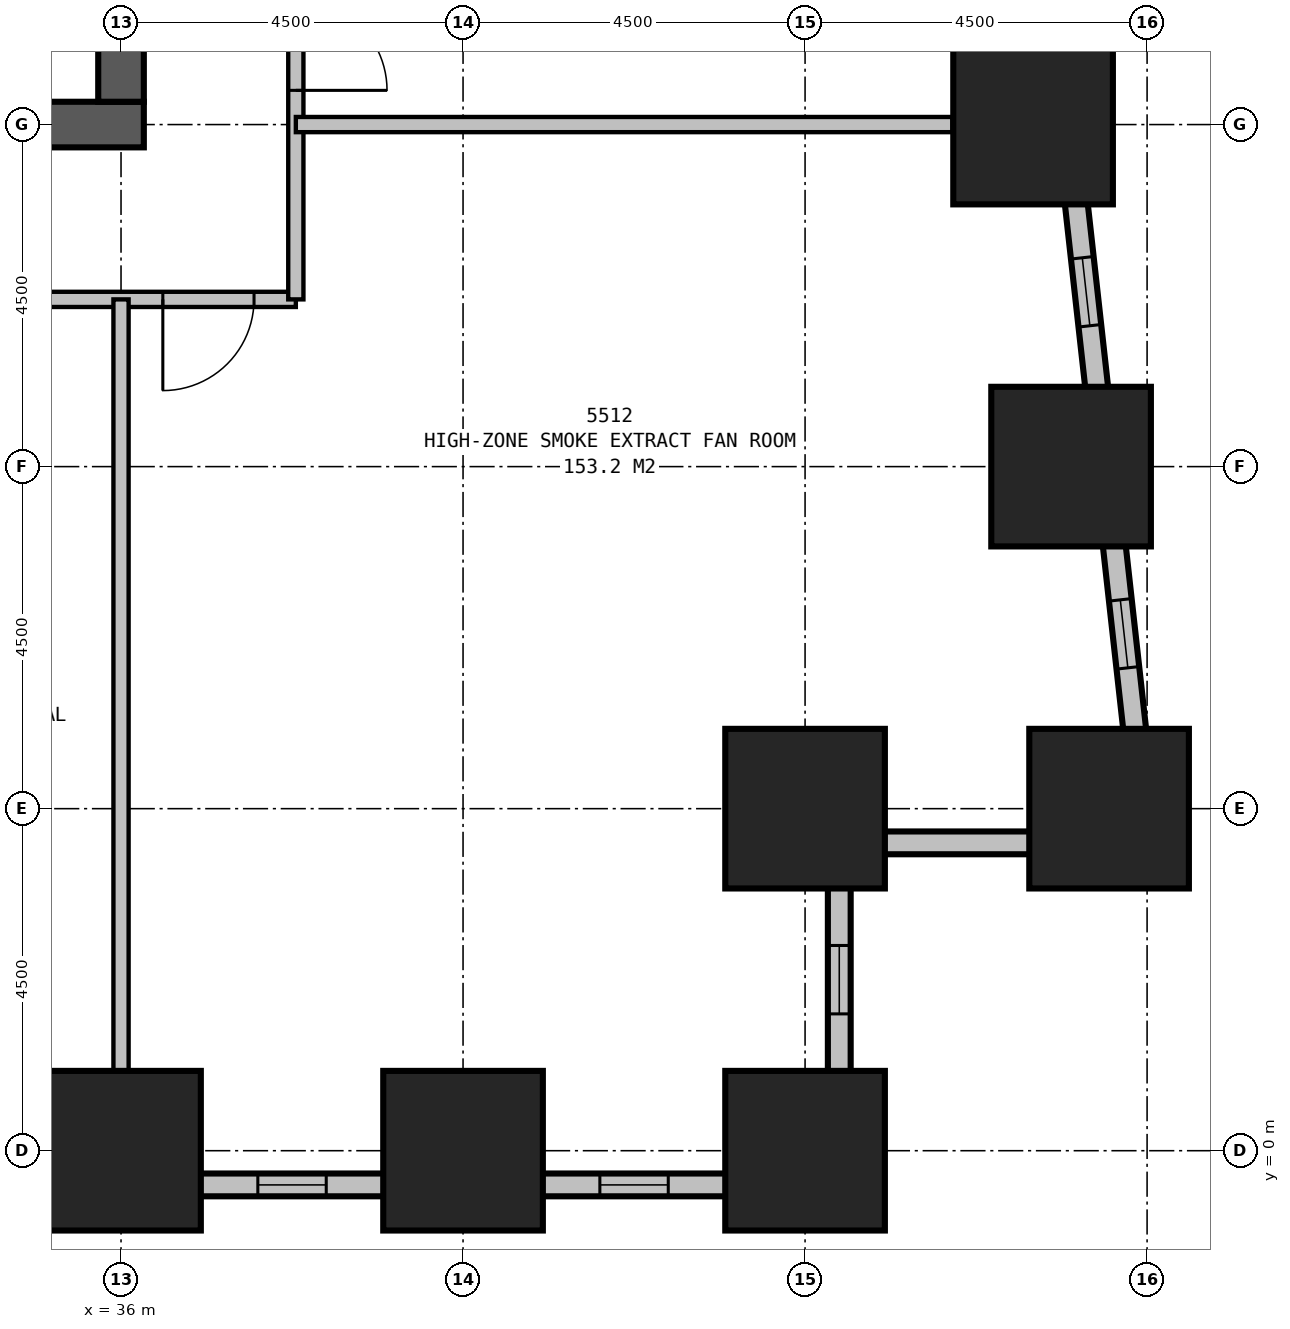
"""IFC4 building model, lengths in metres.
Left out: names, types, materials, properties, quantities, classifications, styles, units other than length and angle.
Written with IfcOpenShell. Run it as: python <this file> out.ifc"""

import sys

from ifc_helpers import new_model, si_unit, direction, frame, frame_2d, origin, origin_2d, place, context, subcontext, project, spatial, rectangle, extrude, element, fill, save


model = new_model("IFC4")
c1 = context("Model", 3, precision=1e-05, world=origin(), true_north=direction((0.0, 1.0)))
c2 = subcontext(c1, "Body", "Model", "MODEL_VIEW")
j1 = project(units=[si_unit("LENGTHUNIT", "METRE"), si_unit("PLANEANGLEUNIT", "RADIAN")], contexts=[c1])
p1 = place(None, origin())
s1 = spatial("IfcSite", under=j1, at=p1, CompositionType="ELEMENT")
p2 = place(p1, origin())
s2 = spatial("IfcBuilding", under=s1, at=p2, CompositionType="ELEMENT")
p3 = place(p2, frame((0.0, 0.0, 211.4)))
s3 = spatial("IfcBuildingStorey", under=s2, at=p3, CompositionType="ELEMENT", Elevation=211.4)
for number, where, z_axis, x_axis in (
    (1, (36.0, 0.0, 0.0), (0.0, 0.0, 1.0), (1.0, 0.0, 0.0)),
    (2, (40.5, 0.0, 0.0), (0.0, 0.0, 1.0), (1.0, 0.0, 0.0)),
    (3, (45.0, 0.0, 0.0), (0.0, 0.0, 1.0), (1.0, 0.0, 0.0)),
    (4, (45.0, 4.5, 0.0), (0.0, 0.0, 1.0), (1.0, 0.0, 0.0)),
    (5, (49.0, 4.5, 0.0), (0.0, 0.0, 1.0), (1.0, 0.0, 0.0)),
    (6, (48.5, 9.0, 0.0), (0.0, 0.0, 1.0), (1.0, 0.0, 0.0)),
    (7, (48.0, 13.5, 0.0), (0.0, 0.0, 1.0), (1.0, 0.0, 0.0)),
):
    element("IfcColumn", number, at=place(p3, frame(where, z_axis=z_axis, x_axis=x_axis)), inside=s3, PredefinedType="COLUMN", context=c2, shape_type="SweptSolid", body=[
        extrude(rectangle(XDim=2.1, YDim=2.1, at=origin_2d()), origin(), (0.0, 0.0, 1.0), 6.0),
    ])
p4 = place(p3, frame((13.2, 13.5, 0.0), z_axis=(0.0, 0.0, 1.0), x_axis=(1.0, 0.0, 0.0)))
e8 = element("IfcWall", 8, at=p4, inside=s3, PredefinedType="SHEAR", context=c2, shape_type="SweptSolid", body=[
    extrude(rectangle(XDim=23.1, YDim=0.6, at=frame_2d((11.55, 0.0))), origin(), (0.0, 0.0, 1.0), 6.0),
])
p5 = place(p3, frame((36.0, 13.8, 0.0), z_axis=(0.0, 0.0, 1.0), x_axis=(0.0, 1.0, 0.0)))
e9 = element("IfcWall", 9, at=p5, inside=s3, PredefinedType="SHEAR", context=c2, shape_type="SweptSolid", body=[
    extrude(rectangle(XDim=2.7, YDim=0.6, at=frame_2d((1.35, 0.0))), origin(), (0.0, 0.0, 1.0), 6.0),
])
p6 = place(p3, frame((8.4, -0.45, 0.0), z_axis=(0.0, 0.0, 1.0), x_axis=(1.0, 0.0, 0.0)))
e10 = element("IfcWall", 10, at=p6, inside=s3, PredefinedType="STANDARD", context=c2, shape_type="SweptSolid", body=[
    extrude(rectangle(XDim=37.2, YDim=0.3, at=frame_2d((18.6, 0.0))), origin(), (0.0, 0.0, 1.0), 4.6),
])
p7 = place(p6, frame((2.4, 0.0, 0.5)))
e11 = element("IfcOpeningElement", 11, at=p7, cuts=e10, PredefinedType="OPENING", context=c2, shape_type="SweptSolid", body=[
    extrude(rectangle(XDim=0.9, YDim=1.2, at=frame_2d((0.45, 0.6))), frame((0.0, 0.16, 0.0), z_axis=(0.0, -1.0, 0.0), x_axis=(1.0, 0.0, 0.0)), (0.0, 0.0, 1.0), 0.32),
])
p8 = place(p6, frame((6.9, 0.0, 0.5)))
e12 = element("IfcOpeningElement", 12, at=p8, cuts=e10, PredefinedType="OPENING", context=c2, shape_type="SweptSolid", body=[
    extrude(rectangle(XDim=0.9, YDim=1.2, at=frame_2d((0.45, 0.6))), frame((0.0, 0.16, 0.0), z_axis=(0.0, -1.0, 0.0), x_axis=(1.0, 0.0, 0.0)), (0.0, 0.0, 1.0), 0.32),
])
p9 = place(p6, frame((11.4, 0.0, 0.5)))
e13 = element("IfcOpeningElement", 13, at=p9, cuts=e10, PredefinedType="OPENING", context=c2, shape_type="SweptSolid", body=[
    extrude(rectangle(XDim=0.9, YDim=1.2, at=frame_2d((0.45, 0.6))), frame((0.0, 0.16, 0.0), z_axis=(0.0, -1.0, 0.0), x_axis=(1.0, 0.0, 0.0)), (0.0, 0.0, 1.0), 0.32),
])
p10 = place(p6, frame((15.9, 0.0, 0.5)))
e14 = element("IfcOpeningElement", 14, at=p10, cuts=e10, PredefinedType="OPENING", context=c2, shape_type="SweptSolid", body=[
    extrude(rectangle(XDim=0.9, YDim=1.2, at=frame_2d((0.45, 0.6))), frame((0.0, 0.16, 0.0), z_axis=(0.0, -1.0, 0.0), x_axis=(1.0, 0.0, 0.0)), (0.0, 0.0, 1.0), 0.32),
])
p11 = place(p6, frame((20.4, 0.0, 0.5)))
e15 = element("IfcOpeningElement", 15, at=p11, cuts=e10, PredefinedType="OPENING", context=c2, shape_type="SweptSolid", body=[
    extrude(rectangle(XDim=0.9, YDim=1.2, at=frame_2d((0.45, 0.6))), frame((0.0, 0.16, 0.0), z_axis=(0.0, -1.0, 0.0), x_axis=(1.0, 0.0, 0.0)), (0.0, 0.0, 1.0), 0.32),
])
p12 = place(p6, frame((24.9, 0.0, 0.5)))
e16 = element("IfcOpeningElement", 16, at=p12, cuts=e10, PredefinedType="OPENING", context=c2, shape_type="SweptSolid", body=[
    extrude(rectangle(XDim=0.9, YDim=1.2, at=frame_2d((0.45, 0.6))), frame((0.0, 0.16, 0.0), z_axis=(0.0, -1.0, 0.0), x_axis=(1.0, 0.0, 0.0)), (0.0, 0.0, 1.0), 0.32),
])
p13 = place(p6, frame((29.4, 0.0, 0.5)))
e17 = element("IfcOpeningElement", 17, at=p13, cuts=e10, PredefinedType="OPENING", context=c2, shape_type="SweptSolid", body=[
    extrude(rectangle(XDim=0.9, YDim=1.2, at=frame_2d((0.45, 0.6))), frame((0.0, 0.16, 0.0), z_axis=(0.0, -1.0, 0.0), x_axis=(1.0, 0.0, 0.0)), (0.0, 0.0, 1.0), 0.32),
])
p14 = place(p6, frame((33.9, 0.0, 0.5)))
e18 = element("IfcOpeningElement", 18, at=p14, cuts=e10, PredefinedType="OPENING", context=c2, shape_type="SweptSolid", body=[
    extrude(rectangle(XDim=0.9, YDim=1.2, at=frame_2d((0.45, 0.6))), frame((0.0, 0.16, 0.0), z_axis=(0.0, -1.0, 0.0), x_axis=(1.0, 0.0, 0.0)), (0.0, 0.0, 1.0), 0.32),
])
p15 = place(p3, frame((45.45, -0.6, 0.0), z_axis=(0.0, 0.0, 1.0), x_axis=(0.0, 1.0, 0.0)))
e19 = element("IfcWall", 19, at=p15, inside=s3, PredefinedType="STANDARD", context=c2, shape_type="SweptSolid", body=[
    extrude(rectangle(XDim=4.8, YDim=0.3, at=frame_2d((2.4, 0.0))), origin(), (0.0, 0.0, 1.0), 4.6),
])
p16 = place(p15, frame((2.4, 0.0, 0.5)))
e20 = element("IfcOpeningElement", 20, at=p16, cuts=e19, PredefinedType="OPENING", context=c2, shape_type="SweptSolid", body=[
    extrude(rectangle(XDim=0.9, YDim=1.2, at=frame_2d((0.45, 0.6))), frame((0.0, 0.16, 0.0), z_axis=(0.0, -1.0, 0.0), x_axis=(1.0, 0.0, 0.0)), (0.0, 0.0, 1.0), 0.32),
])
p17 = place(p3, frame((45.3, 4.05, 0.0), z_axis=(0.0, 0.0, 1.0), x_axis=(1.0, 0.0, 0.0)))
e21 = element("IfcWall", 21, at=p17, inside=s3, PredefinedType="STANDARD", context=c2, shape_type="SweptSolid", body=[
    extrude(rectangle(XDim=4.353, YDim=0.3, at=frame_2d((2.176, 0.0))), origin(), (0.0, 0.0, 1.0), 4.6),
])
p18 = place(p3, frame((49.519, 3.901, 0.0), z_axis=(0.0, 0.0, 1.0), x_axis=(-0.110429082637, 0.993884006164, 0.0)))
e22 = element("IfcWall", 22, at=p18, inside=s3, PredefinedType="STANDARD", context=c2, shape_type="SweptSolid", body=[
    extrude(rectangle(XDim=32.899, YDim=0.3, at=frame_2d((16.45, 0.0))), origin(), (0.0, 0.0, 1.0), 4.6),
])
p19 = place(p18, frame((2.467, 0.0, 0.5)))
e23 = element("IfcOpeningElement", 23, at=p19, cuts=e22, PredefinedType="OPENING", context=c2, shape_type="SweptSolid", body=[
    extrude(rectangle(XDim=0.9, YDim=1.2, at=frame_2d((0.45, 0.6))), frame((0.0, 0.16, 0.0), z_axis=(0.0, -1.0, 0.0), x_axis=(1.0, 0.0, 0.0)), (0.0, 0.0, 1.0), 0.32),
])
p20 = place(p18, frame((6.995, 0.0, 0.5)))
e24 = element("IfcOpeningElement", 24, at=p20, cuts=e22, PredefinedType="OPENING", context=c2, shape_type="SweptSolid", body=[
    extrude(rectangle(XDim=0.9, YDim=1.2, at=frame_2d((0.45, 0.6))), frame((0.0, 0.16, 0.0), z_axis=(0.0, -1.0, 0.0), x_axis=(1.0, 0.0, 0.0)), (0.0, 0.0, 1.0), 0.32),
])
p21 = place(p18, frame((11.522, 0.0, 0.5)))
e25 = element("IfcOpeningElement", 25, at=p21, cuts=e22, PredefinedType="OPENING", context=c2, shape_type="SweptSolid", body=[
    extrude(rectangle(XDim=0.9, YDim=1.2, at=frame_2d((0.45, 0.6))), frame((0.0, 0.16, 0.0), z_axis=(0.0, -1.0, 0.0), x_axis=(1.0, 0.0, 0.0)), (0.0, 0.0, 1.0), 0.32),
])
p22 = place(p18, frame((16.05, 0.0, 0.5)))
e26 = element("IfcOpeningElement", 26, at=p22, cuts=e22, PredefinedType="OPENING", context=c2, shape_type="SweptSolid", body=[
    extrude(rectangle(XDim=0.9, YDim=1.2, at=frame_2d((0.45, 0.6))), frame((0.0, 0.16, 0.0), z_axis=(0.0, -1.0, 0.0), x_axis=(1.0, 0.0, 0.0)), (0.0, 0.0, 1.0), 0.32),
])
p23 = place(p18, frame((20.578, 0.0, 0.5)))
e27 = element("IfcOpeningElement", 27, at=p23, cuts=e22, PredefinedType="OPENING", context=c2, shape_type="SweptSolid", body=[
    extrude(rectangle(XDim=0.9, YDim=1.2, at=frame_2d((0.45, 0.6))), frame((0.0, 0.16, 0.0), z_axis=(0.0, -1.0, 0.0), x_axis=(1.0, 0.0, 0.0)), (0.0, 0.0, 1.0), 0.32),
])
p24 = place(p18, frame((25.105, 0.0, 0.5)))
e28 = element("IfcOpeningElement", 28, at=p24, cuts=e22, PredefinedType="OPENING", context=c2, shape_type="SweptSolid", body=[
    extrude(rectangle(XDim=0.9, YDim=1.2, at=frame_2d((0.45, 0.6))), frame((0.0, 0.16, 0.0), z_axis=(0.0, -1.0, 0.0), x_axis=(1.0, 0.0, 0.0)), (0.0, 0.0, 1.0), 0.32),
])
p25 = place(p18, frame((29.633, 0.0, 0.5)))
e29 = element("IfcOpeningElement", 29, at=p25, cuts=e22, PredefinedType="OPENING", context=c2, shape_type="SweptSolid", body=[
    extrude(rectangle(XDim=0.9, YDim=1.2, at=frame_2d((0.45, 0.6))), frame((0.0, 0.16, 0.0), z_axis=(0.0, -1.0, 0.0), x_axis=(1.0, 0.0, 0.0)), (0.0, 0.0, 1.0), 0.32),
])
p26 = place(p3, frame((11.2, 11.2, 0.0), z_axis=(0.0, 0.0, 1.0), x_axis=(1.0, 0.0, 0.0)))
e30 = element("IfcWall", 30, at=p26, inside=s3, PredefinedType="PARTITIONING", context=c2, shape_type="SweptSolid", body=[
    extrude(rectangle(XDim=27.1, YDim=0.2, at=frame_2d((13.55, 0.0))), origin(), (0.0, 0.0, 1.0), 5.75),
])
p27 = place(p26, frame((4.95, 0.0, 0.0), z_axis=(0.0, 0.0, 1.0), x_axis=(-1.0, 0.0, 0.0)))
e31 = element("IfcOpeningElement", 31, at=p27, cuts=e30, PredefinedType="OPENING", context=c2, shape_type="SweptSolid", body=[
    extrude(rectangle(XDim=1.8, YDim=2.4, at=frame_2d((0.9, 1.2))), frame((0.0, 0.11, 0.0), z_axis=(0.0, -1.0, 0.0), x_axis=(1.0, 0.0, 0.0)), (0.0, 0.0, 1.0), 0.22),
])
p28 = place(p26, frame((17.5, 0.0, 0.0), z_axis=(0.0, 0.0, 1.0), x_axis=(-1.0, 0.0, 0.0)))
e32 = element("IfcOpeningElement", 32, at=p28, cuts=e30, PredefinedType="OPENING", context=c2, shape_type="SweptSolid", body=[
    extrude(rectangle(XDim=1.0, YDim=2.1, at=frame_2d((0.5, 1.05))), frame((0.0, 0.11, 0.0), z_axis=(0.0, -1.0, 0.0), x_axis=(1.0, 0.0, 0.0)), (0.0, 0.0, 1.0), 0.22),
])
p29 = place(p26, frame((19.6, 0.0, 0.0), z_axis=(0.0, 0.0, 1.0), x_axis=(-1.0, 0.0, 0.0)))
e33 = element("IfcOpeningElement", 33, at=p29, cuts=e30, PredefinedType="OPENING", context=c2, shape_type="SweptSolid", body=[
    extrude(rectangle(XDim=1.0, YDim=2.1, at=frame_2d((0.5, 1.05))), frame((0.0, 0.11, 0.0), z_axis=(0.0, -1.0, 0.0), x_axis=(1.0, 0.0, 0.0)), (0.0, 0.0, 1.0), 0.22),
])
p30 = place(p26, frame((21.75, 0.0, 0.0), z_axis=(0.0, 0.0, 1.0), x_axis=(-1.0, 0.0, 0.0)))
e34 = element("IfcOpeningElement", 34, at=p30, cuts=e30, PredefinedType="OPENING", context=c2, shape_type="SweptSolid", body=[
    extrude(rectangle(XDim=1.0, YDim=2.1, at=frame_2d((0.5, 1.05))), frame((0.0, 0.11, 0.0), z_axis=(0.0, -1.0, 0.0), x_axis=(1.0, 0.0, 0.0)), (0.0, 0.0, 1.0), 0.22),
])
p31 = place(p26, frame((1.45, 0.0, 0.0), z_axis=(0.0, 0.0, 1.0), x_axis=(-1.0, 0.0, 0.0)))
e35 = element("IfcOpeningElement", 35, at=p31, cuts=e30, PredefinedType="OPENING", context=c2, shape_type="SweptSolid", body=[
    extrude(rectangle(XDim=1.0, YDim=2.1, at=frame_2d((0.5, 1.05))), frame((0.0, 0.11, 0.0), z_axis=(0.0, -1.0, 0.0), x_axis=(1.0, 0.0, 0.0)), (0.0, 0.0, 1.0), 0.22),
])
p32 = place(p26, frame((26.55, 0.0, 0.0), z_axis=(0.0, 0.0, 1.0), x_axis=(-1.0, 0.0, 0.0)))
e36 = element("IfcOpeningElement", 36, at=p32, cuts=e30, PredefinedType="OPENING", context=c2, shape_type="SweptSolid", body=[
    extrude(rectangle(XDim=1.2, YDim=2.1, at=frame_2d((0.6, 1.05))), frame((0.0, 0.11, 0.0), z_axis=(0.0, -1.0, 0.0), x_axis=(1.0, 0.0, 0.0)), (0.0, 0.0, 1.0), 0.22),
])
p33 = place(p3, frame((38.3, 11.2, 0.0), z_axis=(0.0, 0.0, 1.0), x_axis=(0.0, 1.0, 0.0)))
e37 = element("IfcWall", 37, at=p33, inside=s3, PredefinedType="PARTITIONING", context=c2, shape_type="SweptSolid", body=[
    extrude(rectangle(XDim=18.1, YDim=0.2, at=frame_2d((9.05, 0.0))), origin(), (0.0, 0.0, 1.0), 5.75),
])
p34 = place(p33, frame((3.95, 0.0, 0.0), z_axis=(0.0, 0.0, 1.0), x_axis=(-1.0, 0.0, 0.0)))
e38 = element("IfcOpeningElement", 38, at=p34, cuts=e37, PredefinedType="OPENING", context=c2, shape_type="SweptSolid", body=[
    extrude(rectangle(XDim=1.2, YDim=2.1, at=frame_2d((0.6, 1.05))), frame((0.0, 0.11, 0.0), z_axis=(0.0, -1.0, 0.0), x_axis=(1.0, 0.0, 0.0)), (0.0, 0.0, 1.0), 0.22),
])
p35 = place(p33, frame((12.75, 0.0, 0.0), z_axis=(0.0, 0.0, 1.0), x_axis=(-1.0, 0.0, 0.0)))
e39 = element("IfcOpeningElement", 39, at=p35, cuts=e37, PredefinedType="OPENING", context=c2, shape_type="SweptSolid", body=[
    extrude(rectangle(XDim=1.0, YDim=2.1, at=frame_2d((0.5, 1.05))), frame((0.0, 0.11, 0.0), z_axis=(0.0, -1.0, 0.0), x_axis=(1.0, 0.0, 0.0)), (0.0, 0.0, 1.0), 0.22),
])
p36 = place(p3, frame((36.0, 11.2, 0.0), z_axis=(0.0, 0.0, 1.0), x_axis=(0.0, -1.0, 0.0)))
e40 = element("IfcWall", 40, at=p36, inside=s3, PredefinedType="PARTITIONING", context=c2, shape_type="SweptSolid", body=[
    extrude(rectangle(XDim=10.15, YDim=0.2, at=frame_2d((5.075, 0.0))), origin(), (0.0, 0.0, 1.0), 4.75),
])
p37 = place(p3, frame((38.3, 13.5, 0.0), z_axis=(0.0, 0.0, 1.0), x_axis=(1.0, 0.0, 0.0)))
e41 = element("IfcWall", 41, at=p37, inside=s3, PredefinedType="PARTITIONING", context=c2, shape_type="SweptSolid", body=[
    extrude(rectangle(XDim=8.639, YDim=0.2, at=frame_2d((4.32, 0.0))), origin(), (0.0, 0.0, 1.0), 4.45),
])
p38 = place(p13, origin())
e42 = element("IfcWindow", 42, at=p38, inside=s3, PartitioningType="SINGLE_PANEL", PredefinedType="USERDEFINED", context=c2, shape_type="SweptSolid", body=[
    extrude(rectangle(XDim=0.9, YDim=1.2, at=frame_2d((0.45, 0.6))), frame((0.0, 0.03, 0.0), z_axis=(0.0, -1.0, 0.0), x_axis=(1.0, 0.0, 0.0)), (0.0, 0.0, 1.0), 0.06),
])
fill(e17, e42)
p39 = place(p14, origin())
e43 = element("IfcWindow", 43, at=p39, inside=s3, PartitioningType="SINGLE_PANEL", PredefinedType="USERDEFINED", context=c2, shape_type="SweptSolid", body=[
    extrude(rectangle(XDim=0.9, YDim=1.2, at=frame_2d((0.45, 0.6))), frame((0.0, 0.03, 0.0), z_axis=(0.0, -1.0, 0.0), x_axis=(1.0, 0.0, 0.0)), (0.0, 0.0, 1.0), 0.06),
])
fill(e18, e43)
p40 = place(p16, origin())
e44 = element("IfcWindow", 44, at=p40, inside=s3, PartitioningType="SINGLE_PANEL", PredefinedType="USERDEFINED", context=c2, shape_type="SweptSolid", body=[
    extrude(rectangle(XDim=0.9, YDim=1.2, at=frame_2d((0.45, 0.6))), frame((0.0, 0.03, 0.0), z_axis=(0.0, -1.0, 0.0), x_axis=(1.0, 0.0, 0.0)), (0.0, 0.0, 1.0), 0.06),
])
fill(e20, e44)
p41 = place(p19, origin())
e45 = element("IfcWindow", 45, at=p41, inside=s3, PartitioningType="SINGLE_PANEL", PredefinedType="USERDEFINED", context=c2, shape_type="SweptSolid", body=[
    extrude(rectangle(XDim=0.9, YDim=1.2, at=frame_2d((0.45, 0.6))), frame((0.0, 0.03, 0.0), z_axis=(0.0, -1.0, 0.0), x_axis=(1.0, 0.0, 0.0)), (0.0, 0.0, 1.0), 0.06),
])
fill(e23, e45)
p42 = place(p20, origin())
e46 = element("IfcWindow", 46, at=p42, inside=s3, PartitioningType="SINGLE_PANEL", PredefinedType="USERDEFINED", context=c2, shape_type="SweptSolid", body=[
    extrude(rectangle(XDim=0.9, YDim=1.2, at=frame_2d((0.45, 0.6))), frame((0.0, 0.03, 0.0), z_axis=(0.0, -1.0, 0.0), x_axis=(1.0, 0.0, 0.0)), (0.0, 0.0, 1.0), 0.06),
])
fill(e24, e46)
p43 = place(p32, origin())
e47 = element("IfcDoor", 47, at=p43, inside=s3, OperationType="SINGLE_SWING_RIGHT", PredefinedType="DOOR", context=c2, shape_type="SweptSolid", body=[
    extrude(rectangle(XDim=1.2, YDim=2.1, at=frame_2d((0.6, 1.05))), frame((0.0, 0.025, 0.0), z_axis=(0.0, -1.0, 0.0), x_axis=(1.0, 0.0, 0.0)), (0.0, 0.0, 1.0), 0.05),
])
fill(e36, e47)
p44 = place(p34, origin())
e48 = element("IfcDoor", 48, at=p44, inside=s3, OperationType="SINGLE_SWING_RIGHT", PredefinedType="DOOR", context=c2, shape_type="SweptSolid", body=[
    extrude(rectangle(XDim=1.2, YDim=2.1, at=frame_2d((0.6, 1.05))), frame((0.0, 0.025, 0.0), z_axis=(0.0, -1.0, 0.0), x_axis=(1.0, 0.0, 0.0)), (0.0, 0.0, 1.0), 0.05),
])
fill(e38, e48)
save(model, sys.argv[1])
